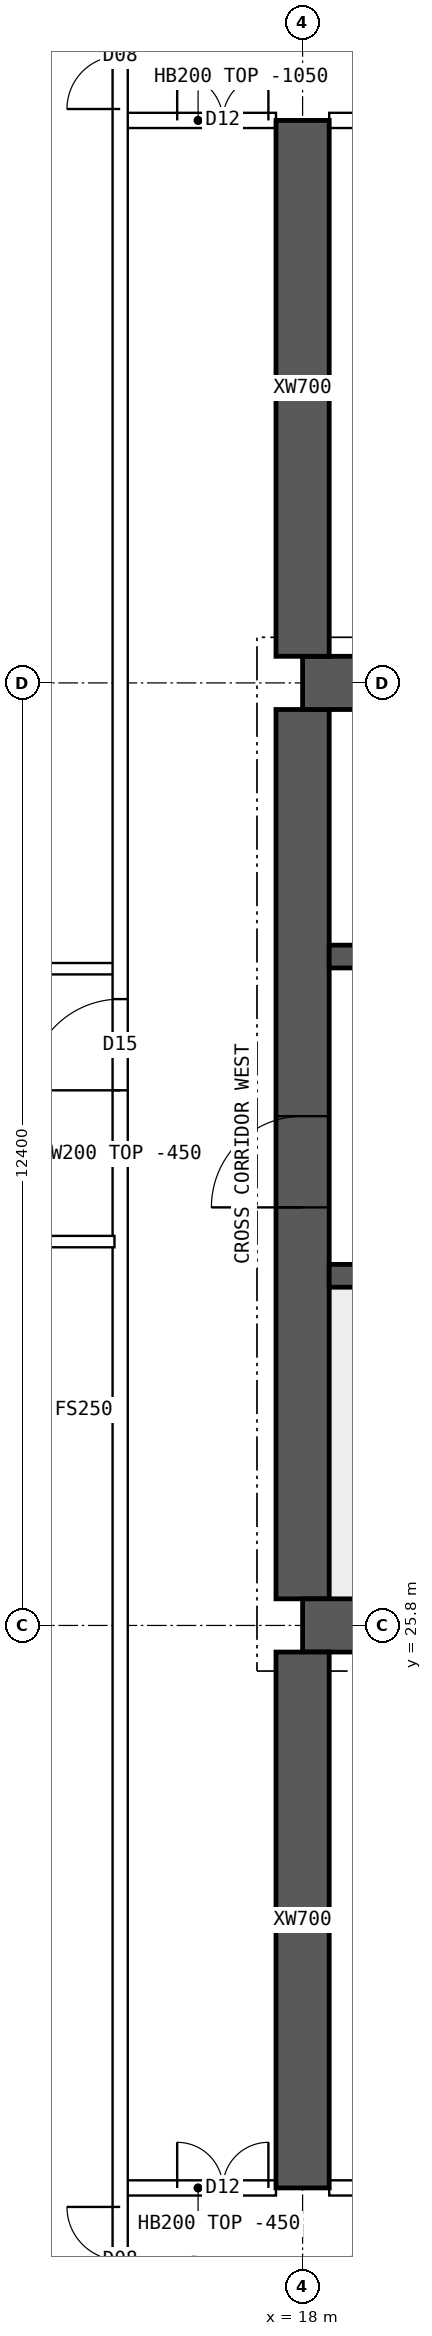
"""IFC4 building model, lengths in metres.
Left out: names, types, materials, properties, quantities, classifications, styles, units other than length and angle.
Written with IfcOpenShell. Run it as: python <this file> out.ifc"""

import sys

from ifc_helpers import new_model, si_unit, direction, frame, frame_2d, origin, place, context, subcontext, project, spatial, polyline, rectangle, outline, extrude, element, fill, save


model = new_model("IFC4")
c1 = context("Model", 3, precision=1e-05, world=origin(), true_north=direction((0.0, 1.0)))
c2 = subcontext(c1, "Body", "Model", "MODEL_VIEW")
j1 = project(units=[si_unit("LENGTHUNIT", "METRE"), si_unit("PLANEANGLEUNIT", "RADIAN")], contexts=[c1])
p1 = place(None, origin())
s1 = spatial("IfcSite", under=j1, at=p1, CompositionType="ELEMENT")
p2 = place(p1, origin())
s2 = spatial("IfcBuilding", under=s1, at=p2, CompositionType="ELEMENT")
p3 = place(p2, frame((0.0, 0.0, 242.8)))
s3 = spatial("IfcBuildingStorey", under=s2, at=p3, CompositionType="ELEMENT", Elevation=242.8)
for number, where, z_axis, x_axis in (
    (1, (18.0, 25.8, 0.0), (0.0, 0.0, 1.0), (1.0, 0.0, 0.0)),
    (2, (18.0, 38.2, 0.0), (0.0, 0.0, 1.0), (1.0, 0.0, 0.0)),
):
    element("IfcWall", number, at=place(p3, frame(where, z_axis=z_axis, x_axis=x_axis)), inside=s3, PredefinedType="SHEAR", context=c2, shape_type="SweptSolid", body=[
        extrude(rectangle(XDim=48.0, YDim=0.7, at=frame_2d((24.0, 0.0))), origin(), (0.0, 0.0, 1.0), 3.75),
    ])
p4 = place(p3, frame((18.0, 26.15, 0.0), z_axis=(0.0, 0.0, 1.0), x_axis=(0.0, 1.0, 0.0)))
e3 = element("IfcWall", 3, at=p4, inside=s3, PredefinedType="SHEAR", context=c2, shape_type="SweptSolid", body=[
    extrude(rectangle(XDim=11.7, YDim=0.7, at=frame_2d((5.85, 0.0))), origin(), (0.0, 0.0, 1.0), 3.75),
])
p5 = place(p4, frame((5.15, 0.0, 0.0)))
e4 = element("IfcOpeningElement", 4, at=p5, cuts=e3, PredefinedType="OPENING", context=c2, shape_type="SweptSolid", body=[
    extrude(rectangle(XDim=1.2, YDim=2.1, at=frame_2d((0.6, 1.05))), frame((0.0, 0.36, 0.0), z_axis=(0.0, -1.0, 0.0), x_axis=(1.0, 0.0, 0.0)), (0.0, 0.0, 1.0), 0.72),
])
p6 = place(p3, frame((18.35, 30.4, 0.0), z_axis=(0.0, 0.0, 1.0), x_axis=(1.0, 0.0, 0.0)))
e5 = element("IfcWall", 5, at=p6, inside=s3, PredefinedType="SHEAR", context=c2, shape_type="SweptSolid", body=[
    extrude(rectangle(XDim=47.3, YDim=0.3, at=frame_2d((23.65, 0.0))), origin(), (0.0, 0.0, 1.0), 3.75),
])
p7 = place(p6, frame((0.4, 0.0, 0.0)))
e6 = element("IfcOpeningElement", 6, at=p7, cuts=e5, PredefinedType="OPENING", context=c2, shape_type="SweptSolid", body=[
    extrude(rectangle(XDim=1.0, YDim=2.1, at=frame_2d((0.5, 1.05))), frame((0.0, 0.16, 0.0), z_axis=(0.0, -1.0, 0.0), x_axis=(1.0, 0.0, 0.0)), (0.0, 0.0, 1.0), 0.32),
])
p8 = place(p6, frame((45.9, 0.0, 0.0)))
e7 = element("IfcOpeningElement", 7, at=p8, cuts=e5, PredefinedType="OPENING", context=c2, shape_type="SweptSolid", body=[
    extrude(rectangle(XDim=1.0, YDim=2.1, at=frame_2d((0.5, 1.05))), frame((0.0, 0.16, 0.0), z_axis=(0.0, -1.0, 0.0), x_axis=(1.0, 0.0, 0.0)), (0.0, 0.0, 1.0), 0.32),
])
p9 = place(p6, frame((8.4, 0.0, 0.0)))
e8 = element("IfcOpeningElement", 8, at=p9, cuts=e5, PredefinedType="OPENING", context=c2, shape_type="SweptSolid", body=[
    extrude(rectangle(XDim=1.1, YDim=2.1, at=frame_2d((0.55, 1.05))), frame((0.0, 0.16, 0.0), z_axis=(0.0, -1.0, 0.0), x_axis=(1.0, 0.0, 0.0)), (0.0, 0.0, 1.0), 0.32),
])
p10 = place(p6, frame((11.0, 0.0, 0.0)))
e9 = element("IfcOpeningElement", 9, at=p10, cuts=e5, PredefinedType="OPENING", context=c2, shape_type="SweptSolid", body=[
    extrude(rectangle(XDim=1.1, YDim=2.1, at=frame_2d((0.55, 1.05))), frame((0.0, 0.16, 0.0), z_axis=(0.0, -1.0, 0.0), x_axis=(1.0, 0.0, 0.0)), (0.0, 0.0, 1.0), 0.32),
])
p11 = place(p6, frame((13.6, 0.0, 0.0)))
e10 = element("IfcOpeningElement", 10, at=p11, cuts=e5, PredefinedType="OPENING", context=c2, shape_type="SweptSolid", body=[
    extrude(rectangle(XDim=1.1, YDim=2.1, at=frame_2d((0.55, 1.05))), frame((0.0, 0.16, 0.0), z_axis=(0.0, -1.0, 0.0), x_axis=(1.0, 0.0, 0.0)), (0.0, 0.0, 1.0), 0.32),
])
p12 = place(p6, frame((16.2, 0.0, 0.0)))
e11 = element("IfcOpeningElement", 11, at=p12, cuts=e5, PredefinedType="OPENING", context=c2, shape_type="SweptSolid", body=[
    extrude(rectangle(XDim=1.1, YDim=2.1, at=frame_2d((0.55, 1.05))), frame((0.0, 0.16, 0.0), z_axis=(0.0, -1.0, 0.0), x_axis=(1.0, 0.0, 0.0)), (0.0, 0.0, 1.0), 0.32),
])
p13 = place(p6, frame((18.975, 0.0, 0.0)))
e12 = element("IfcOpeningElement", 12, at=p13, cuts=e5, PredefinedType="OPENING", context=c2, shape_type="SweptSolid", body=[
    extrude(rectangle(XDim=0.9, YDim=2.1, at=frame_2d((0.45, 1.05))), frame((0.0, 0.16, 0.0), z_axis=(0.0, -1.0, 0.0), x_axis=(1.0, 0.0, 0.0)), (0.0, 0.0, 1.0), 0.32),
])
p14 = place(p6, frame((24.475, 0.0, 0.0)))
e13 = element("IfcOpeningElement", 13, at=p14, cuts=e5, PredefinedType="OPENING", context=c2, shape_type="SweptSolid", body=[
    extrude(rectangle(XDim=0.9, YDim=2.1, at=frame_2d((0.45, 1.05))), frame((0.0, 0.16, 0.0), z_axis=(0.0, -1.0, 0.0), x_axis=(1.0, 0.0, 0.0)), (0.0, 0.0, 1.0), 0.32),
])
p15 = place(p6, frame((30.267, 0.0, 0.0)))
e14 = element("IfcOpeningElement", 14, at=p15, cuts=e5, PredefinedType="OPENING", context=c2, shape_type="SweptSolid", body=[
    extrude(rectangle(XDim=1.1, YDim=2.1, at=frame_2d((0.55, 1.05))), frame((0.0, 0.16, 0.0), z_axis=(0.0, -1.0, 0.0), x_axis=(1.0, 0.0, 0.0)), (0.0, 0.0, 1.0), 0.32),
])
p16 = place(p6, frame((33.8, 0.0, 0.0)))
e15 = element("IfcOpeningElement", 15, at=p16, cuts=e5, PredefinedType="OPENING", context=c2, shape_type="SweptSolid", body=[
    extrude(rectangle(XDim=1.1, YDim=2.1, at=frame_2d((0.55, 1.05))), frame((0.0, 0.16, 0.0), z_axis=(0.0, -1.0, 0.0), x_axis=(1.0, 0.0, 0.0)), (0.0, 0.0, 1.0), 0.32),
])
p17 = place(p6, frame((37.333, 0.0, 0.0)))
e16 = element("IfcOpeningElement", 16, at=p17, cuts=e5, PredefinedType="OPENING", context=c2, shape_type="SweptSolid", body=[
    extrude(rectangle(XDim=1.1, YDim=2.1, at=frame_2d((0.55, 1.05))), frame((0.0, 0.16, 0.0), z_axis=(0.0, -1.0, 0.0), x_axis=(1.0, 0.0, 0.0)), (0.0, 0.0, 1.0), 0.32),
])
p18 = place(p3, frame((18.35, 34.6, 0.0), z_axis=(0.0, 0.0, 1.0), x_axis=(1.0, 0.0, 0.0)))
e17 = element("IfcWall", 17, at=p18, inside=s3, PredefinedType="SHEAR", context=c2, shape_type="SweptSolid", body=[
    extrude(rectangle(XDim=47.3, YDim=0.3, at=frame_2d((23.65, 0.0))), origin(), (0.0, 0.0, 1.0), 3.75),
])
p19 = place(p18, frame((0.9, 0.0, 0.0)))
e18 = element("IfcOpeningElement", 18, at=p19, cuts=e17, PredefinedType="OPENING", context=c2, shape_type="SweptSolid", body=[
    extrude(rectangle(XDim=1.1, YDim=2.1, at=frame_2d((0.55, 1.05))), frame((0.0, 0.16, 0.0), z_axis=(0.0, -1.0, 0.0), x_axis=(1.0, 0.0, 0.0)), (0.0, 0.0, 1.0), 0.32),
])
p20 = place(p18, frame((45.3, 0.0, 0.0)))
e19 = element("IfcOpeningElement", 19, at=p20, cuts=e17, PredefinedType="OPENING", context=c2, shape_type="SweptSolid", body=[
    extrude(rectangle(XDim=1.1, YDim=2.1, at=frame_2d((0.55, 1.05))), frame((0.0, 0.16, 0.0), z_axis=(0.0, -1.0, 0.0), x_axis=(1.0, 0.0, 0.0)), (0.0, 0.0, 1.0), 0.32),
])
p21 = place(p18, frame((4.25, 0.0, 0.0)))
e20 = element("IfcOpeningElement", 20, at=p21, cuts=e17, PredefinedType="OPENING", context=c2, shape_type="SweptSolid", body=[
    extrude(rectangle(XDim=0.9, YDim=2.1, at=frame_2d((0.45, 1.05))), frame((0.0, 0.16, 0.0), z_axis=(0.0, -1.0, 0.0), x_axis=(1.0, 0.0, 0.0)), (0.0, 0.0, 1.0), 0.32),
])
p22 = place(p18, frame((42.15, 0.0, 0.0)))
e21 = element("IfcOpeningElement", 21, at=p22, cuts=e17, PredefinedType="OPENING", context=c2, shape_type="SweptSolid", body=[
    extrude(rectangle(XDim=0.9, YDim=2.1, at=frame_2d((0.45, 1.05))), frame((0.0, 0.16, 0.0), z_axis=(0.0, -1.0, 0.0), x_axis=(1.0, 0.0, 0.0)), (0.0, 0.0, 1.0), 0.32),
])
p23 = place(p18, frame((9.025, 0.0, 0.0)))
e22 = element("IfcOpeningElement", 22, at=p23, cuts=e17, PredefinedType="OPENING", context=c2, shape_type="SweptSolid", body=[
    extrude(rectangle(XDim=0.9, YDim=2.1, at=frame_2d((0.45, 1.05))), frame((0.0, 0.16, 0.0), z_axis=(0.0, -1.0, 0.0), x_axis=(1.0, 0.0, 0.0)), (0.0, 0.0, 1.0), 0.32),
])
p24 = place(p18, frame((12.999, 0.0, 0.0)))
e23 = element("IfcOpeningElement", 23, at=p24, cuts=e17, PredefinedType="OPENING", context=c2, shape_type="SweptSolid", body=[
    extrude(rectangle(XDim=0.9, YDim=2.1, at=frame_2d((0.45, 1.05))), frame((0.0, 0.16, 0.0), z_axis=(0.0, -1.0, 0.0), x_axis=(1.0, 0.0, 0.0)), (0.0, 0.0, 1.0), 0.32),
])
p25 = place(p18, frame((16.646, 0.0, 0.0)))
e24 = element("IfcOpeningElement", 24, at=p25, cuts=e17, PredefinedType="OPENING", context=c2, shape_type="SweptSolid", body=[
    extrude(rectangle(XDim=0.9, YDim=2.1, at=frame_2d((0.45, 1.05))), frame((0.0, 0.16, 0.0), z_axis=(0.0, -1.0, 0.0), x_axis=(1.0, 0.0, 0.0)), (0.0, 0.0, 1.0), 0.32),
])
p26 = place(p18, frame((20.405, 0.0, 0.0)))
e25 = element("IfcOpeningElement", 25, at=p26, cuts=e17, PredefinedType="OPENING", context=c2, shape_type="SweptSolid", body=[
    extrude(rectangle(XDim=0.9, YDim=2.1, at=frame_2d((0.45, 1.05))), frame((0.0, 0.16, 0.0), z_axis=(0.0, -1.0, 0.0), x_axis=(1.0, 0.0, 0.0)), (0.0, 0.0, 1.0), 0.32),
])
p27 = place(p18, frame((24.811, 0.0, 0.0)))
e26 = element("IfcOpeningElement", 26, at=p27, cuts=e17, PredefinedType="OPENING", context=c2, shape_type="SweptSolid", body=[
    extrude(rectangle(XDim=0.9, YDim=2.1, at=frame_2d((0.45, 1.05))), frame((0.0, 0.16, 0.0), z_axis=(0.0, -1.0, 0.0), x_axis=(1.0, 0.0, 0.0)), (0.0, 0.0, 1.0), 0.32),
])
p28 = place(p18, frame((27.608, 0.0, 0.0)))
e27 = element("IfcOpeningElement", 27, at=p28, cuts=e17, PredefinedType="OPENING", context=c2, shape_type="SweptSolid", body=[
    extrude(rectangle(XDim=0.9, YDim=2.1, at=frame_2d((0.45, 1.05))), frame((0.0, 0.16, 0.0), z_axis=(0.0, -1.0, 0.0), x_axis=(1.0, 0.0, 0.0)), (0.0, 0.0, 1.0), 0.32),
])
p29 = place(p18, frame((29.778, 0.0, 0.0)))
e28 = element("IfcOpeningElement", 28, at=p29, cuts=e17, PredefinedType="OPENING", context=c2, shape_type="SweptSolid", body=[
    extrude(rectangle(XDim=0.9, YDim=2.1, at=frame_2d((0.45, 1.05))), frame((0.0, 0.16, 0.0), z_axis=(0.0, -1.0, 0.0), x_axis=(1.0, 0.0, 0.0)), (0.0, 0.0, 1.0), 0.32),
])
p30 = place(p18, frame((33.577, 0.0, 0.0)))
e29 = element("IfcOpeningElement", 29, at=p30, cuts=e17, PredefinedType="OPENING", context=c2, shape_type="SweptSolid", body=[
    extrude(rectangle(XDim=0.9, YDim=2.1, at=frame_2d((0.45, 1.05))), frame((0.0, 0.16, 0.0), z_axis=(0.0, -1.0, 0.0), x_axis=(1.0, 0.0, 0.0)), (0.0, 0.0, 1.0), 0.32),
])
p31 = place(p18, frame((37.528, 0.0, 0.0)))
e30 = element("IfcOpeningElement", 30, at=p31, cuts=e17, PredefinedType="OPENING", context=c2, shape_type="SweptSolid", body=[
    extrude(rectangle(XDim=0.9, YDim=2.1, at=frame_2d((0.45, 1.05))), frame((0.0, 0.16, 0.0), z_axis=(0.0, -1.0, 0.0), x_axis=(1.0, 0.0, 0.0)), (0.0, 0.0, 1.0), 0.32),
])
for number, where, z_axis, x_axis in (
    (31, (18.0, 18.4, 0.0), (0.0, 0.0, 1.0), (0.0, 1.0, 0.0)),
    (32, (18.0, 38.55, 0.0), (0.0, 0.0, 1.0), (0.0, 1.0, 0.0)),
):
    element("IfcWall", number, at=place(p3, frame(where, z_axis=z_axis, x_axis=x_axis)), inside=s3, PredefinedType="SHEAR", context=c2, shape_type="SweptSolid", body=[
        extrude(rectangle(XDim=7.05, YDim=0.7, at=frame_2d((3.525, 0.0))), origin(), (0.0, 0.0, 1.0), 3.75),
    ])
p32 = place(p3, frame((15.6, 18.4, 0.0), z_axis=(0.0, 0.0, 1.0), x_axis=(1.0, 0.0, 0.0)))
e33 = element("IfcWall", 33, at=p32, inside=s3, PredefinedType="SOLIDWALL", context=c2, shape_type="SweptSolid", body=[
    extrude(rectangle(XDim=2.05, YDim=0.2, at=frame_2d((1.025, 0.0))), origin(), (0.0, 0.0, 1.0), 3.3),
])
p33 = place(p32, frame((0.75, 0.0, 0.0)))
e34 = element("IfcOpeningElement", 34, at=p33, cuts=e33, PredefinedType="OPENING", context=c2, shape_type="SweptSolid", body=[
    extrude(rectangle(XDim=1.2, YDim=2.1, at=frame_2d((0.6, 1.05))), frame((0.0, 0.11, 0.0), z_axis=(0.0, -1.0, 0.0), x_axis=(1.0, 0.0, 0.0)), (0.0, 0.0, 1.0), 0.22),
])
p34 = place(p3, frame((18.35, 18.4, 0.0), z_axis=(0.0, 0.0, 1.0), x_axis=(1.0, 0.0, 0.0)))
e35 = element("IfcWall", 35, at=p34, inside=s3, PredefinedType="SOLIDWALL", context=c2, shape_type="SweptSolid", body=[
    extrude(rectangle(XDim=5.3, YDim=0.2, at=frame_2d((2.65, 0.0))), origin(), (0.0, 0.0, 1.0), 3.3),
])
p35 = place(p34, frame((0.35, 0.0, 0.0)))
e36 = element("IfcOpeningElement", 36, at=p35, cuts=e35, PredefinedType="OPENING", context=c2, shape_type="SweptSolid", body=[
    extrude(rectangle(XDim=0.9, YDim=2.1, at=frame_2d((0.45, 1.05))), frame((0.0, 0.11, 0.0), z_axis=(0.0, -1.0, 0.0), x_axis=(1.0, 0.0, 0.0)), (0.0, 0.0, 1.0), 0.22),
])
p36 = place(p34, frame((2.725, 0.0, 0.0)))
e37 = element("IfcOpeningElement", 37, at=p36, cuts=e35, PredefinedType="OPENING", context=c2, shape_type="SweptSolid", body=[
    extrude(rectangle(XDim=0.9, YDim=2.1, at=frame_2d((0.45, 1.05))), frame((0.0, 0.11, 0.0), z_axis=(0.0, -1.0, 0.0), x_axis=(1.0, 0.0, 0.0)), (0.0, 0.0, 1.0), 0.22),
])
p37 = place(p3, frame((15.6, 45.6, 0.0), z_axis=(0.0, 0.0, 1.0), x_axis=(1.0, 0.0, 0.0)))
e38 = element("IfcWall", 38, at=p37, inside=s3, PredefinedType="SOLIDWALL", context=c2, shape_type="SweptSolid", body=[
    extrude(rectangle(XDim=2.05, YDim=0.2, at=frame_2d((1.025, 0.0))), origin(), (0.0, 0.0, 1.0), 2.7),
])
p38 = place(p37, frame((0.75, 0.0, 0.0)))
e39 = element("IfcOpeningElement", 39, at=p38, cuts=e38, PredefinedType="OPENING", context=c2, shape_type="SweptSolid", body=[
    extrude(rectangle(XDim=1.2, YDim=2.1, at=frame_2d((0.6, 1.05))), frame((0.0, 0.11, 0.0), z_axis=(0.0, -1.0, 0.0), x_axis=(1.0, 0.0, 0.0)), (0.0, 0.0, 1.0), 0.22),
])
p39 = place(p3, frame((18.35, 45.6, 0.0), z_axis=(0.0, 0.0, 1.0), x_axis=(1.0, 0.0, 0.0)))
e40 = element("IfcWall", 40, at=p39, inside=s3, PredefinedType="SOLIDWALL", context=c2, shape_type="SweptSolid", body=[
    extrude(rectangle(XDim=5.3, YDim=0.2, at=frame_2d((2.65, 0.0))), origin(), (0.0, 0.0, 1.0), 3.3),
])
p40 = place(p39, frame((0.8, 0.0, 0.0)))
e41 = element("IfcOpeningElement", 41, at=p40, cuts=e40, PredefinedType="OPENING", context=c2, shape_type="SweptSolid", body=[
    extrude(rectangle(XDim=1.0, YDim=2.1, at=frame_2d((0.5, 1.05))), frame((0.0, 0.11, 0.0), z_axis=(0.0, -1.0, 0.0), x_axis=(1.0, 0.0, 0.0)), (0.0, 0.0, 1.0), 0.22),
])
p41 = place(p3, frame((8.705, 30.85, 0.0), z_axis=(0.0, 0.0, 1.0), x_axis=(1.0, 0.0, 0.0)))
e42 = element("IfcWall", 42, at=p41, inside=s3, PredefinedType="PARTITIONING", context=c2, shape_type="SweptSolid", body=[
    extrude(outline(polyline([(0.0, 0.0), (6.82, 0.0), (6.82, 3.3), (3.597, 3.3), (3.595, 2.85), (2.997, 2.85), (2.995, 3.3), (0.0, 3.3), (0.0, 0.0)])), frame((0.0, 0.075, 0.0), z_axis=(0.0, -1.0, 0.0), x_axis=(1.0, 0.0, 0.0)), (0.0, 0.0, 1.0), 0.15),
])
p42 = place(p3, frame((15.6, 11.646, 0.0), z_axis=(0.0, 0.0, 1.0), x_axis=(0.0, 1.0, 0.0)))
e43 = element("IfcWall", 43, at=p42, inside=s3, PredefinedType="SOLIDWALL", context=c2, shape_type="SweptSolid", body=[
    extrude(rectangle(XDim=40.708, YDim=0.2, at=frame_2d((20.354, 0.0))), origin(), (0.0, 0.0, 1.0), 3.3),
])
p43 = place(p42, frame((21.194, 0.0, 0.0)))
e44 = element("IfcOpeningElement", 44, at=p43, cuts=e43, PredefinedType="OPENING", context=c2, shape_type="SweptSolid", body=[
    extrude(rectangle(XDim=1.2, YDim=2.1, at=frame_2d((0.6, 1.05))), frame((0.0, 0.11, 0.0), z_axis=(0.0, -1.0, 0.0), x_axis=(1.0, 0.0, 0.0)), (0.0, 0.0, 1.0), 0.22),
])
p44 = place(p42, frame((5.104, 0.0, 0.0)))
e45 = element("IfcOpeningElement", 45, at=p44, cuts=e43, PredefinedType="OPENING", context=c2, shape_type="SweptSolid", body=[
    extrude(rectangle(XDim=1.4, YDim=2.1, at=frame_2d((0.7, 1.05))), frame((0.0, 0.11, 0.0), z_axis=(0.0, -1.0, 0.0), x_axis=(1.0, 0.0, 0.0)), (0.0, 0.0, 1.0), 0.22),
])
p45 = place(p42, frame((34.104, 0.0, 0.0)))
e46 = element("IfcOpeningElement", 46, at=p45, cuts=e43, PredefinedType="OPENING", context=c2, shape_type="SweptSolid", body=[
    extrude(rectangle(XDim=1.4, YDim=2.1, at=frame_2d((0.7, 1.05))), frame((0.0, 0.11, 0.0), z_axis=(0.0, -1.0, 0.0), x_axis=(1.0, 0.0, 0.0)), (0.0, 0.0, 1.0), 0.22),
])
p46 = place(p3, frame((8.705, 34.44, 0.0), z_axis=(0.0, 0.0, 1.0), x_axis=(1.0, 0.0, 0.0)))
e47 = element("IfcWall", 47, at=p46, inside=s3, PredefinedType="PARTITIONING", context=c2, shape_type="SweptSolid", body=[
    extrude(outline(polyline([(0.0, 0.0), (6.82, 0.0), (6.82, 3.3), (3.597, 3.3), (3.595, 2.85), (2.997, 2.85), (2.995, 3.3), (0.0, 3.3), (0.0, 0.0)])), frame((0.0, 0.075, 0.0), z_axis=(0.0, -1.0, 0.0), x_axis=(1.0, 0.0, 0.0)), (0.0, 0.0, 1.0), 0.15),
])
p47 = place(p5, origin())
e48 = element("IfcDoor", 48, at=p47, inside=s3, OperationType="SINGLE_SWING_LEFT", PredefinedType="DOOR", context=c2, shape_type="SweptSolid", body=[
    extrude(rectangle(XDim=1.2, YDim=2.1, at=frame_2d((0.6, 1.05))), frame((0.0, 0.025, 0.0), z_axis=(0.0, -1.0, 0.0), x_axis=(1.0, 0.0, 0.0)), (0.0, 0.0, 1.0), 0.05),
])
fill(e4, e48)
p48 = place(p33, origin())
e49 = element("IfcDoor", 49, at=p48, inside=s3, OperationType="DOUBLE_DOOR_SINGLE_SWING", PredefinedType="DOOR", context=c2, shape_type="SweptSolid", body=[
    extrude(rectangle(XDim=1.2, YDim=2.1, at=frame_2d((0.6, 1.05))), frame((0.0, 0.025, 0.0), z_axis=(0.0, -1.0, 0.0), x_axis=(1.0, 0.0, 0.0)), (0.0, 0.0, 1.0), 0.05),
])
fill(e34, e49)
p49 = place(p38, origin())
e50 = element("IfcDoor", 50, at=p49, inside=s3, OperationType="DOUBLE_DOOR_SINGLE_SWING", PredefinedType="DOOR", context=c2, shape_type="SweptSolid", body=[
    extrude(rectangle(XDim=1.2, YDim=2.1, at=frame_2d((0.6, 1.05))), frame((0.0, 0.025, 0.0), z_axis=(0.0, -1.0, 0.0), x_axis=(1.0, 0.0, 0.0)), (0.0, 0.0, 1.0), 0.05),
])
fill(e39, e50)
p50 = place(p43, origin())
e51 = element("IfcDoor", 51, at=p50, inside=s3, OperationType="SINGLE_SWING_LEFT", PredefinedType="DOOR", context=c2, shape_type="SweptSolid", body=[
    extrude(rectangle(XDim=1.2, YDim=2.1, at=frame_2d((0.6, 1.05))), frame((0.0, 0.025, 0.0), z_axis=(0.0, -1.0, 0.0), x_axis=(1.0, 0.0, 0.0)), (0.0, 0.0, 1.0), 0.05),
])
fill(e44, e51)
p51 = place(p44, origin())
e52 = element("IfcDoor", 52, at=p51, inside=s3, OperationType="DOUBLE_DOOR_SINGLE_SWING", PredefinedType="DOOR", context=c2, shape_type="SweptSolid", body=[
    extrude(rectangle(XDim=1.4, YDim=2.1, at=frame_2d((0.7, 1.05))), frame((0.0, 0.025, 0.0), z_axis=(0.0, -1.0, 0.0), x_axis=(1.0, 0.0, 0.0)), (0.0, 0.0, 1.0), 0.05),
])
fill(e45, e52)
p52 = place(p45, origin())
e53 = element("IfcDoor", 53, at=p52, inside=s3, OperationType="DOUBLE_DOOR_SINGLE_SWING", PredefinedType="DOOR", context=c2, shape_type="SweptSolid", body=[
    extrude(rectangle(XDim=1.4, YDim=2.1, at=frame_2d((0.7, 1.05))), frame((0.0, 0.025, 0.0), z_axis=(0.0, -1.0, 0.0), x_axis=(1.0, 0.0, 0.0)), (0.0, 0.0, 1.0), 0.05),
])
fill(e46, e53)
save(model, sys.argv[1])
